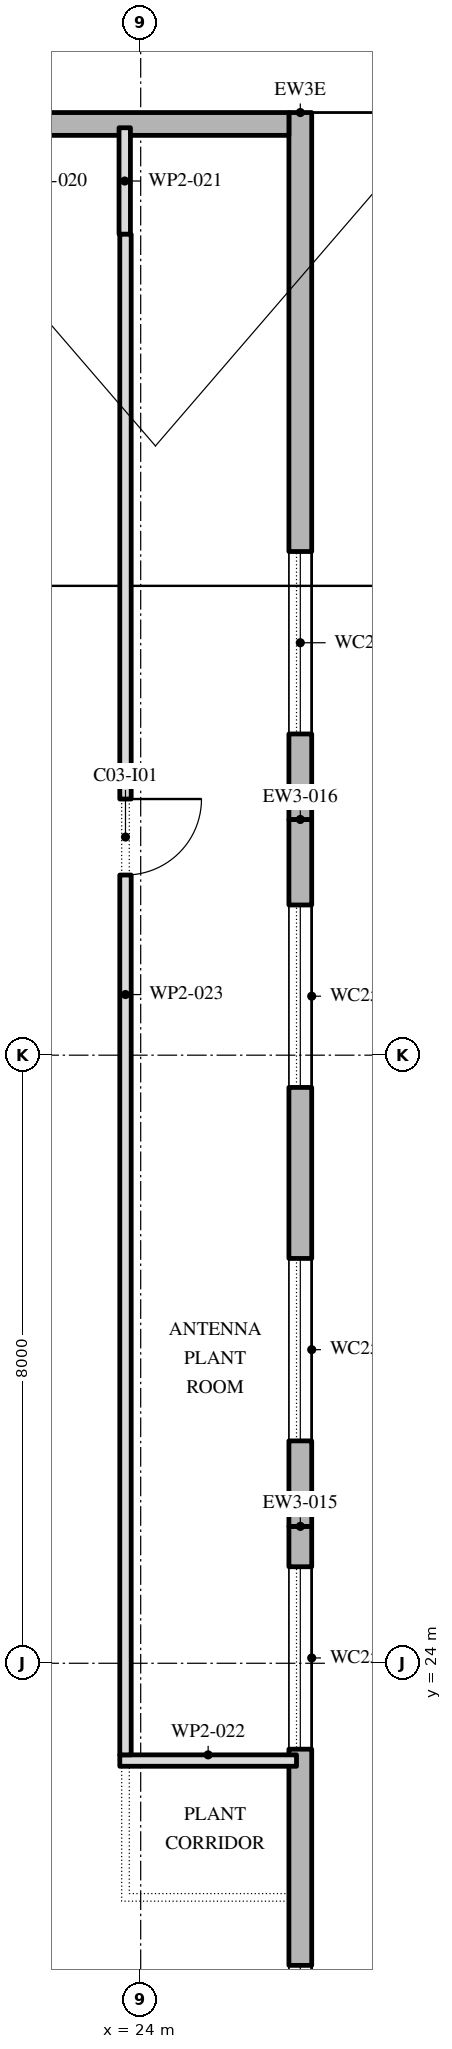
"""IFC4 building model, lengths in metres.
Left out: names, types, materials, properties, quantities, classifications, styles, units other than length and angle.
Written with IfcOpenShell. Run it as: python <this file> out.ifc"""

import sys

from ifc_helpers import new_model, si_unit, direction, frame, frame_2d, origin, place, context, subcontext, project, spatial, polyline, rectangle, outline, extrude, element, fill, save


model = new_model("IFC4")
c1 = context("Model", 3, precision=1e-05, world=origin(), true_north=direction((0.0, 1.0)))
c2 = subcontext(c1, "Body", "Model", "MODEL_VIEW")
j1 = project(units=[si_unit("LENGTHUNIT", "METRE"), si_unit("PLANEANGLEUNIT", "RADIAN")], contexts=[c1])
p1 = place(None, origin())
s1 = spatial("IfcSite", under=j1, at=p1, CompositionType="ELEMENT")
p2 = place(p1, origin())
s2 = spatial("IfcBuilding", under=s1, at=p2, CompositionType="ELEMENT")
p3 = place(p2, frame((0.0, 0.0, 377.4)))
s3 = spatial("IfcBuildingStorey", under=s2, at=p3, CompositionType="ELEMENT", Elevation=377.4)
p4 = place(p3, frame((26.1, 16.5, 0.0), z_axis=(0.0, 0.0, 1.0), x_axis=(0.0, 1.0, 0.0)))
e1 = element("IfcWall", 1, at=p4, inside=s3, PredefinedType="STANDARD", context=c2, shape_type="SweptSolid", body=[
    extrude(rectangle(XDim=9.3, YDim=0.3, at=frame_2d((4.65, 0.0))), origin(), (0.0, 0.0, 1.0), 4.0),
])
p5 = place(p4, frame((1.125, 0.0, 0.8)))
e2 = element("IfcOpeningElement", 2, at=p5, cuts=e1, PredefinedType="OPENING", context=c2, shape_type="SweptSolid", body=[
    extrude(outline(polyline([(0.0, 0.0), (2.4, 0.0), (2.4, 1.25), (2.377, 1.488), (2.31, 1.717), (2.2, 1.929), (2.051, 2.116), (1.87, 2.272), (1.663, 2.391), (1.437, 2.468), (1.2, 2.5), (0.963, 2.468), (0.737, 2.391), (0.53, 2.272), (0.349, 2.116), (0.2, 1.929), (0.09, 1.717), (0.023, 1.488), (0.0, 1.25), (0.0, 0.0)])), frame((0.0, 0.16, 0.0), z_axis=(0.0, -1.0, 0.0), x_axis=(1.0, 0.0, 0.0)), (0.0, 0.0, 1.0), 0.32),
])
p6 = place(p4, frame((6.369, 0.0, 0.8)))
e3 = element("IfcOpeningElement", 3, at=p6, cuts=e1, PredefinedType="OPENING", context=c2, shape_type="SweptSolid", body=[
    extrude(outline(polyline([(0.0, 0.0), (2.4, 0.0), (2.4, 1.25), (2.377, 1.488), (2.31, 1.717), (2.2, 1.929), (2.051, 2.116), (1.87, 2.272), (1.663, 2.391), (1.437, 2.468), (1.2, 2.5), (0.963, 2.468), (0.737, 2.391), (0.53, 2.272), (0.349, 2.116), (0.2, 1.929), (0.09, 1.717), (0.023, 1.488), (0.0, 1.25), (0.0, 0.0)])), frame((0.0, 0.16, 0.0), z_axis=(0.0, -1.0, 0.0), x_axis=(1.0, 0.0, 0.0)), (0.0, 0.0, 1.0), 0.32),
])
p7 = place(p3, frame((26.1, 25.801, 0.0), z_axis=(0.0, 0.0, 1.0), x_axis=(0.0, 1.0, 0.0)))
e4 = element("IfcWall", 4, at=p7, inside=s3, PredefinedType="STANDARD", context=c2, shape_type="SweptSolid", body=[
    extrude(rectangle(XDim=9.3, YDim=0.3, at=frame_2d((4.65, 0.0))), origin(), (0.0, 0.0, 1.0), 4.0),
])
p8 = place(p7, frame((1.125, 0.0, 0.8)))
e5 = element("IfcOpeningElement", 5, at=p8, cuts=e4, PredefinedType="OPENING", context=c2, shape_type="SweptSolid", body=[
    extrude(outline(polyline([(0.0, 0.0), (2.4, 0.0), (2.4, 1.25), (2.377, 1.488), (2.31, 1.717), (2.2, 1.929), (2.051, 2.116), (1.87, 2.272), (1.663, 2.391), (1.437, 2.468), (1.2, 2.5), (0.963, 2.468), (0.737, 2.391), (0.53, 2.272), (0.349, 2.116), (0.2, 1.929), (0.09, 1.717), (0.023, 1.488), (0.0, 1.25), (0.0, 0.0)])), frame((0.0, 0.16, 0.0), z_axis=(0.0, -1.0, 0.0), x_axis=(1.0, 0.0, 0.0)), (0.0, 0.0, 1.0), 0.32),
])
p9 = place(p7, frame((5.775, 0.0, 0.8)))
e6 = element("IfcOpeningElement", 6, at=p9, cuts=e4, PredefinedType="OPENING", context=c2, shape_type="SweptSolid", body=[
    extrude(outline(polyline([(0.0, 0.0), (2.4, 0.0), (2.4, 1.25), (2.377, 1.488), (2.31, 1.717), (2.2, 1.929), (2.051, 2.116), (1.87, 2.272), (1.663, 2.391), (1.437, 2.468), (1.2, 2.5), (0.963, 2.468), (0.737, 2.391), (0.53, 2.272), (0.349, 2.116), (0.2, 1.929), (0.09, 1.717), (0.023, 1.488), (0.0, 1.25), (0.0, 0.0)])), frame((0.0, 0.16, 0.0), z_axis=(0.0, -1.0, 0.0), x_axis=(1.0, 0.0, 0.0)), (0.0, 0.0, 1.0), 0.32),
])
p10 = place(p3, frame((26.1, 35.101, 0.0), z_axis=(0.0, 0.0, 1.0), x_axis=(0.0, 1.0, 0.0)))
e7 = element("IfcWall", 7, at=p10, inside=s3, PredefinedType="STANDARD", context=c2, shape_type="SweptSolid", body=[
    extrude(outline(polyline([(0.0, 0.0), (9.3, 0.0), (9.3, 2.098), (6.481, 4.0), (3.094, 6.285), (3.073, 6.298), (3.073, 4.0), (0.0, 4.0), (0.0, 0.0)])), frame((0.0, 0.15, 0.0), z_axis=(0.0, -1.0, 0.0), x_axis=(1.0, 0.0, 0.0)), (0.0, 0.0, 1.0), 0.3),
])
p11 = place(p10, frame((1.125, 0.0, 0.8)))
e8 = element("IfcOpeningElement", 8, at=p11, cuts=e7, PredefinedType="OPENING", context=c2, shape_type="SweptSolid", body=[
    extrude(outline(polyline([(0.0, 0.0), (2.4, 0.0), (2.4, 0.85), (2.377, 1.088), (2.31, 1.317), (2.2, 1.529), (2.051, 1.717), (1.87, 1.872), (1.663, 1.991), (1.437, 2.068), (1.2, 2.1), (0.963, 2.068), (0.737, 1.991), (0.53, 1.872), (0.349, 1.717), (0.2, 1.529), (0.09, 1.317), (0.023, 1.088), (0.0, 0.85), (0.0, 0.0)])), frame((0.0, 0.16, 0.0), z_axis=(0.0, -1.0, 0.0), x_axis=(1.0, 0.0, 0.0)), (0.0, 0.0, 1.0), 0.32),
])
p12 = place(p3, frame((25.95, 44.251, 0.0), z_axis=(0.0, 0.0, 1.0), x_axis=(-1.0, 0.0, 0.0)))
e9 = element("IfcWall", 9, at=p12, inside=s3, PredefinedType="STANDARD", context=c2, shape_type="SweptSolid", body=[
    extrude(rectangle(XDim=8.7, YDim=0.3, at=frame_2d((4.35, 0.0))), origin(), (0.0, 0.0, 1.0), 2.2),
])
p13 = place(p3, frame((23.79, 44.201, 0.0), z_axis=(0.0, 0.0, 1.0), x_axis=(0.0, -1.0, 0.0)))
e10 = element("IfcWall", 10, at=p13, inside=s3, PredefinedType="PARTITIONING", context=c2, shape_type="SweptSolid", body=[
    extrude(rectangle(XDim=1.401, YDim=0.15, at=frame_2d((0.7, 0.0))), origin(), (0.0, 0.0, 1.0), 4.0),
])
p14 = place(p3, frame((23.725, 22.72, 0.0), z_axis=(0.0, 0.0, 1.0), x_axis=(1.0, 0.0, 0.0)))
e11 = element("IfcWall", 11, at=p14, inside=s3, PredefinedType="PARTITIONING", context=c2, shape_type="SweptSolid", body=[
    extrude(rectangle(XDim=2.325, YDim=0.15, at=frame_2d((1.163, 0.0))), origin(), (0.0, 0.0, 1.0), 4.0),
])
p15 = place(p3, frame((23.8, 42.8, 0.0), z_axis=(0.0, 0.0, 1.0), x_axis=(0.0, -1.0, 0.0)))
e12 = element("IfcWall", 12, at=p15, inside=s3, PredefinedType="PARTITIONING", context=c2, shape_type="SweptSolid", body=[
    extrude(rectangle(XDim=20.005, YDim=0.15, at=frame_2d((10.002, 0.0))), origin(), (0.0, 0.0, 1.0), 4.0),
])
p16 = place(p15, frame((7.43, 0.0, 0.0)))
e13 = element("IfcOpeningElement", 13, at=p16, cuts=e12, PredefinedType="OPENING", context=c2, shape_type="SweptSolid", body=[
    extrude(rectangle(XDim=1.0, YDim=2.1, at=frame_2d((0.5, 1.05))), frame((0.0, 0.085, 0.0), z_axis=(0.0, -1.0, 0.0), x_axis=(1.0, 0.0, 0.0)), (0.0, 0.0, 1.0), 0.17),
])
p17 = place(p5, origin())
e14 = element("IfcWindow", 14, at=p17, inside=s3, PartitioningType="DOUBLE_PANEL_VERTICAL", PredefinedType="WINDOW", context=c2, shape_type="SweptSolid", body=[
    extrude(outline(polyline([(0.0, 0.0), (2.4, 0.0), (2.4, 1.25), (2.377, 1.488), (2.31, 1.717), (2.2, 1.929), (2.051, 2.116), (1.87, 2.272), (1.663, 2.391), (1.437, 2.468), (1.2, 2.5), (0.963, 2.468), (0.737, 2.391), (0.53, 2.272), (0.349, 2.116), (0.2, 1.929), (0.09, 1.717), (0.023, 1.488), (0.0, 1.25), (0.0, 0.0)])), frame((0.0, 0.03, 0.0), z_axis=(0.0, -1.0, 0.0), x_axis=(1.0, 0.0, 0.0)), (0.0, 0.0, 1.0), 0.06),
])
fill(e2, e14)
p18 = place(p6, origin())
e15 = element("IfcWindow", 15, at=p18, inside=s3, PartitioningType="DOUBLE_PANEL_VERTICAL", PredefinedType="WINDOW", context=c2, shape_type="SweptSolid", body=[
    extrude(outline(polyline([(0.0, 0.0), (2.4, 0.0), (2.4, 1.25), (2.377, 1.488), (2.31, 1.717), (2.2, 1.929), (2.051, 2.116), (1.87, 2.272), (1.663, 2.391), (1.437, 2.468), (1.2, 2.5), (0.963, 2.468), (0.737, 2.391), (0.53, 2.272), (0.349, 2.116), (0.2, 1.929), (0.09, 1.717), (0.023, 1.488), (0.0, 1.25), (0.0, 0.0)])), frame((0.0, 0.03, 0.0), z_axis=(0.0, -1.0, 0.0), x_axis=(1.0, 0.0, 0.0)), (0.0, 0.0, 1.0), 0.06),
])
fill(e3, e15)
p19 = place(p8, origin())
e16 = element("IfcWindow", 16, at=p19, inside=s3, PartitioningType="DOUBLE_PANEL_VERTICAL", PredefinedType="WINDOW", context=c2, shape_type="SweptSolid", body=[
    extrude(outline(polyline([(0.0, 0.0), (2.4, 0.0), (2.4, 1.25), (2.377, 1.488), (2.31, 1.717), (2.2, 1.929), (2.051, 2.116), (1.87, 2.272), (1.663, 2.391), (1.437, 2.468), (1.2, 2.5), (0.963, 2.468), (0.737, 2.391), (0.53, 2.272), (0.349, 2.116), (0.2, 1.929), (0.09, 1.717), (0.023, 1.488), (0.0, 1.25), (0.0, 0.0)])), frame((0.0, 0.03, 0.0), z_axis=(0.0, -1.0, 0.0), x_axis=(1.0, 0.0, 0.0)), (0.0, 0.0, 1.0), 0.06),
])
fill(e5, e16)
p20 = place(p9, origin())
e17 = element("IfcWindow", 17, at=p20, inside=s3, PartitioningType="DOUBLE_PANEL_VERTICAL", PredefinedType="WINDOW", context=c2, shape_type="SweptSolid", body=[
    extrude(outline(polyline([(0.0, 0.0), (2.4, 0.0), (2.4, 1.25), (2.377, 1.488), (2.31, 1.717), (2.2, 1.929), (2.051, 2.116), (1.87, 2.272), (1.663, 2.391), (1.437, 2.468), (1.2, 2.5), (0.963, 2.468), (0.737, 2.391), (0.53, 2.272), (0.349, 2.116), (0.2, 1.929), (0.09, 1.717), (0.023, 1.488), (0.0, 1.25), (0.0, 0.0)])), frame((0.0, 0.03, 0.0), z_axis=(0.0, -1.0, 0.0), x_axis=(1.0, 0.0, 0.0)), (0.0, 0.0, 1.0), 0.06),
])
fill(e6, e17)
p21 = place(p11, origin())
e18 = element("IfcWindow", 18, at=p21, inside=s3, PartitioningType="DOUBLE_PANEL_VERTICAL", PredefinedType="WINDOW", context=c2, shape_type="SweptSolid", body=[
    extrude(outline(polyline([(0.0, 0.0), (2.4, 0.0), (2.4, 0.85), (2.377, 1.088), (2.31, 1.317), (2.2, 1.529), (2.051, 1.717), (1.87, 1.872), (1.663, 1.991), (1.437, 2.068), (1.2, 2.1), (0.963, 2.068), (0.737, 1.991), (0.53, 1.872), (0.349, 1.717), (0.2, 1.529), (0.09, 1.317), (0.023, 1.088), (0.0, 0.85), (0.0, 0.0)])), frame((0.0, 0.03, 0.0), z_axis=(0.0, -1.0, 0.0), x_axis=(1.0, 0.0, 0.0)), (0.0, 0.0, 1.0), 0.06),
])
fill(e8, e18)
p22 = place(p16, origin())
e19 = element("IfcDoor", 19, at=p22, inside=s3, OperationType="SINGLE_SWING_RIGHT", PredefinedType="DOOR", context=c2, shape_type="SweptSolid", body=[
    extrude(rectangle(XDim=1.0, YDim=2.1, at=frame_2d((0.5, 1.05))), frame((0.0, 0.025, 0.0), z_axis=(0.0, -1.0, 0.0), x_axis=(1.0, 0.0, 0.0)), (0.0, 0.0, 1.0), 0.05),
])
fill(e13, e19)
save(model, sys.argv[1])
